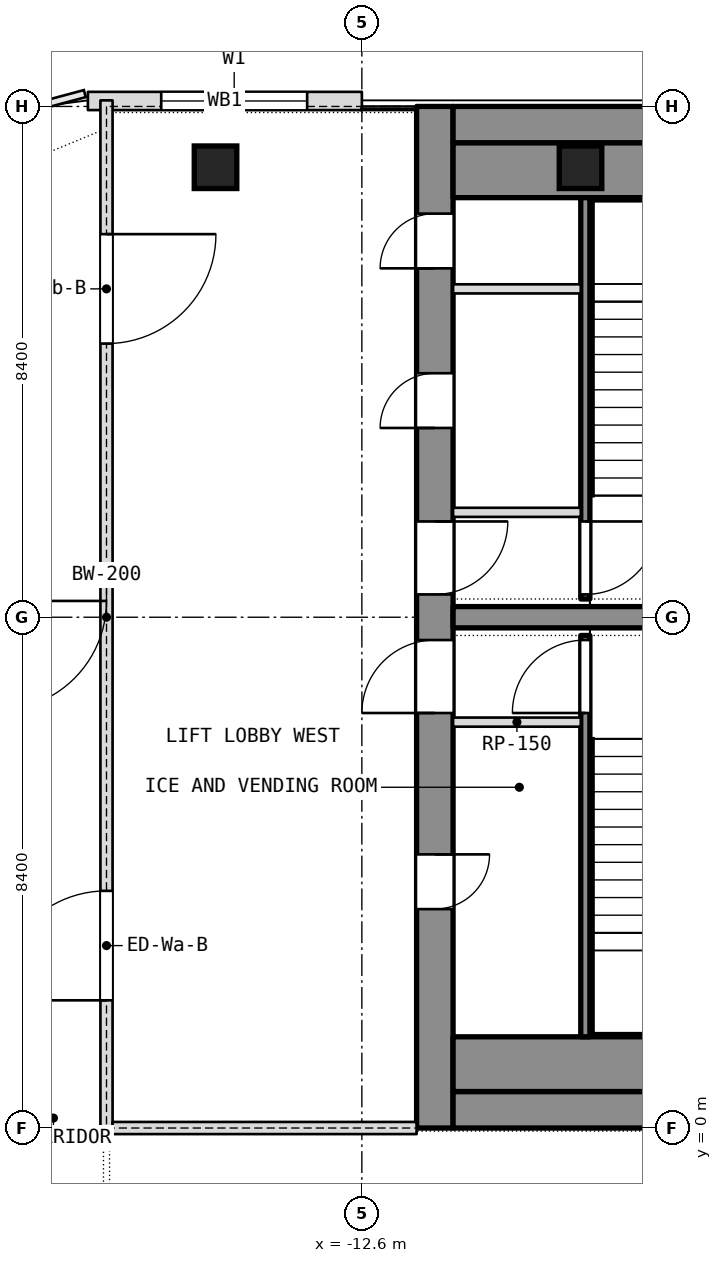
"""IFC4 building model, lengths in metres.
Left out: names, types, materials, properties, quantities, classifications, styles, units other than length and angle.
Written with IfcOpenShell. Run it as: python <this file> out.ifc"""

import sys

from ifc_helpers import new_model, si_unit, direction, frame, frame_2d, origin, origin_2d, place, context, subcontext, project, spatial, rectangle, extrude, element, fill, save


model = new_model("IFC4")
c1 = context("Model", 3, precision=1e-05, world=origin(), true_north=direction((0.0, 1.0)))
c2 = subcontext(c1, "Body", "Model", "MODEL_VIEW")
j1 = project(units=[si_unit("LENGTHUNIT", "METRE"), si_unit("PLANEANGLEUNIT", "RADIAN")], contexts=[c1])
p1 = place(None, origin())
s1 = spatial("IfcSite", under=j1, at=p1, CompositionType="ELEMENT")
p2 = place(p1, origin())
s2 = spatial("IfcBuilding", under=s1, at=p2, CompositionType="ELEMENT")
p3 = place(p2, frame((0.0, 0.0, 274.1)))
s3 = spatial("IfcBuildingStorey", under=s2, at=p3, CompositionType="ELEMENT", Elevation=274.1)
p4 = place(p3, frame((-11.4, 0.0, 0.0), z_axis=(0.0, 0.0, 1.0), x_axis=(0.0, 1.0, 0.0)))
e1 = element("IfcWall", 1, at=p4, inside=s3, PredefinedType="SHEAR", context=c2, shape_type="SweptSolid", body=[
    extrude(rectangle(XDim=16.8, YDim=0.6, at=frame_2d((8.4, 0.0))), origin(), (0.0, 0.0, 1.0), 3.6),
])
p5 = place(p4, frame((3.6, 0.0, 0.0)))
e2 = element("IfcOpeningElement", 2, at=p5, cuts=e1, PredefinedType="OPENING", context=c2, shape_type="SweptSolid", body=[
    extrude(rectangle(XDim=0.9, YDim=2.1, at=frame_2d((0.45, 1.05))), frame((0.0, 0.3, 0.0), z_axis=(0.0, -1.0, 0.0), x_axis=(1.0, 0.0, 0.0)), (0.0, 0.0, 1.0), 0.6),
])
p6 = place(p4, frame((6.825, 0.0, 0.0)))
e3 = element("IfcOpeningElement", 3, at=p6, cuts=e1, PredefinedType="OPENING", context=c2, shape_type="SweptSolid", body=[
    extrude(rectangle(XDim=1.2, YDim=2.1, at=frame_2d((0.6, 1.05))), frame((0.0, 0.3, 0.0), z_axis=(0.0, -1.0, 0.0), x_axis=(1.0, 0.0, 0.0)), (0.0, 0.0, 1.0), 0.6),
])
p7 = place(p4, frame((14.137, 0.0, 0.0)))
e4 = element("IfcOpeningElement", 4, at=p7, cuts=e1, PredefinedType="OPENING", context=c2, shape_type="SweptSolid", body=[
    extrude(rectangle(XDim=0.9, YDim=2.1, at=frame_2d((0.45, 1.05))), frame((0.0, 0.3, 0.0), z_axis=(0.0, -1.0, 0.0), x_axis=(1.0, 0.0, 0.0)), (0.0, 0.0, 1.0), 0.6),
])
p8 = place(p4, frame((11.512, 0.0, 0.0)))
e5 = element("IfcOpeningElement", 5, at=p8, cuts=e1, PredefinedType="OPENING", context=c2, shape_type="SweptSolid", body=[
    extrude(rectangle(XDim=0.9, YDim=2.1, at=frame_2d((0.45, 1.05))), frame((0.0, 0.3, 0.0), z_axis=(0.0, -1.0, 0.0), x_axis=(1.0, 0.0, 0.0)), (0.0, 0.0, 1.0), 0.6),
])
p9 = place(p4, frame((8.775, 0.0, 0.0)))
e6 = element("IfcOpeningElement", 6, at=p9, cuts=e1, PredefinedType="OPENING", context=c2, shape_type="SweptSolid", body=[
    extrude(rectangle(XDim=1.2, YDim=2.1, at=frame_2d((0.6, 1.05))), frame((0.0, 0.3, 0.0), z_axis=(0.0, -1.0, 0.0), x_axis=(1.0, 0.0, 0.0)), (0.0, 0.0, 1.0), 0.6),
])
for number, where, z_axis, x_axis in (
    (7, (-11.1, 0.3, 0.0), (0.0, 0.0, 1.0), (1.0, 0.0, 0.0)),
    (8, (-11.1, 16.5, 0.0), (0.0, 0.0, 1.0), (1.0, 0.0, 0.0)),
):
    element("IfcWall", number, at=place(p3, frame(where, z_axis=z_axis, x_axis=x_axis)), inside=s3, PredefinedType="SHEAR", context=c2, shape_type="SweptSolid", body=[
        extrude(rectangle(XDim=22.2, YDim=0.6, at=frame_2d((11.1, 0.0))), origin(), (0.0, 0.0, 1.0), 3.6),
    ])
p10 = place(p3, frame((-11.1, 8.4, 0.0), z_axis=(0.0, 0.0, 1.0), x_axis=(1.0, 0.0, 0.0)))
e9 = element("IfcWall", 9, at=p10, inside=s3, PredefinedType="SHEAR", context=c2, shape_type="SweptSolid", body=[
    extrude(rectangle(XDim=6.725, YDim=0.35, at=frame_2d((3.363, 0.0))), origin(), (0.0, 0.0, 1.0), 3.6),
])
for number, where, z_axis, x_axis in (
    (10, (-15.007, 15.8, 0.0), (0.0, 0.0, 1.0), (1.0, 0.0, 0.0)),
    (11, (-9.004, 15.8, 0.0), (0.0, 0.0, 1.0), (1.0, 0.0, 0.0)),
):
    element("IfcColumn", number, at=place(p3, frame(where, z_axis=z_axis, x_axis=x_axis)), inside=s3, PredefinedType="COLUMN", context=c2, shape_type="SweptSolid", body=[
        extrude(rectangle(XDim=0.7, YDim=0.7, at=origin_2d()), origin(), (0.0, 0.0, 1.0), 3.6),
    ])
p11 = place(p3, frame((-12.6, 16.89, 0.0), z_axis=(0.0, 0.0, 1.0), x_axis=(-1.0, 0.0, 0.0)))
e12 = element("IfcWall", 12, at=p11, inside=s3, PredefinedType="NOTDEFINED", context=c2, shape_type="SweptSolid", body=[
    extrude(rectangle(XDim=4.506, YDim=0.3, at=frame_2d((2.253, 0.0))), origin(), (0.0, 0.0, 1.0), 3.6),
])
p12 = place(p11, frame((0.9, 0.0, 0.9)))
e13 = element("IfcOpeningElement", 13, at=p12, cuts=e12, PredefinedType="OPENING", context=c2, shape_type="SweptSolid", body=[
    extrude(rectangle(XDim=2.4, YDim=2.1, at=frame_2d((1.2, 1.05))), frame((0.0, 0.15, 0.0), z_axis=(0.0, -1.0, 0.0), x_axis=(1.0, 0.0, 0.0)), (0.0, 0.0, 1.0), 0.3),
])
for number, where, z_axis, x_axis in (
    (14, (-11.1, 1.05, 0.0), (0.0, 0.0, 1.0), (1.0, 0.0, 0.0)),
    (15, (-11.1, 15.75, 0.0), (0.0, 0.0, 1.0), (1.0, 0.0, 0.0)),
):
    element("IfcWall", number, at=place(p3, frame(where, z_axis=z_axis, x_axis=x_axis)), inside=s3, PredefinedType="PARTITIONING", context=c2, shape_type="SweptSolid", body=[
        extrude(rectangle(XDim=22.2, YDim=0.9, at=frame_2d((11.1, 0.0))), origin(), (0.0, 0.0, 1.0), 3.34),
    ])
p13 = place(p3, frame((-8.925, 1.5, 0.0), z_axis=(0.0, 0.0, 1.0), x_axis=(0.0, 1.0, 0.0)))
e16 = element("IfcWall", 16, at=p13, inside=s3, PredefinedType="SHEAR", context=c2, shape_type="SweptSolid", body=[
    extrude(rectangle(XDim=6.6, YDim=0.15, at=frame_2d((3.3, 0.0))), origin(), (0.0, 0.0, 1.0), 3.34),
])
p14 = place(p13, frame((5.325, 0.0, 0.0)))
e17 = element("IfcOpeningElement", 17, at=p14, cuts=e16, PredefinedType="OPENING", context=c2, shape_type="SweptSolid", body=[
    extrude(rectangle(XDim=1.2, YDim=2.1, at=frame_2d((0.6, 1.05))), frame((0.0, 0.075, 0.0), z_axis=(0.0, -1.0, 0.0), x_axis=(1.0, 0.0, 0.0)), (0.0, 0.0, 1.0), 0.15),
])
p15 = place(p3, frame((-11.1, 6.675, 0.0), z_axis=(0.0, 0.0, 1.0), x_axis=(1.0, 0.0, 0.0)))
e18 = element("IfcWall", 18, at=p15, inside=s3, PredefinedType="PARTITIONING", context=c2, shape_type="SweptSolid", body=[
    extrude(rectangle(XDim=2.1, YDim=0.15, at=frame_2d((1.05, 0.0))), origin(), (0.0, 0.0, 1.0), 3.34),
])
p16 = place(p3, frame((-8.925, 8.7, 0.0), z_axis=(0.0, 0.0, 1.0), x_axis=(0.0, 1.0, 0.0)))
e19 = element("IfcWall", 19, at=p16, inside=s3, PredefinedType="SHEAR", context=c2, shape_type="SweptSolid", body=[
    extrude(rectangle(XDim=6.6, YDim=0.15, at=frame_2d((3.3, 0.0))), origin(), (0.0, 0.0, 1.0), 3.34),
])
p17 = place(p16, frame((0.075, 0.0, 0.0)))
e20 = element("IfcOpeningElement", 20, at=p17, cuts=e19, PredefinedType="OPENING", context=c2, shape_type="SweptSolid", body=[
    extrude(rectangle(XDim=1.2, YDim=2.1, at=frame_2d((0.6, 1.05))), frame((0.0, 0.075, 0.0), z_axis=(0.0, -1.0, 0.0), x_axis=(1.0, 0.0, 0.0)), (0.0, 0.0, 1.0), 0.15),
])
for number, where, z_axis, x_axis in (
    (21, (-11.1, 10.125, 0.0), (0.0, 0.0, 1.0), (1.0, 0.0, 0.0)),
    (22, (-11.1, 13.8, 0.0), (0.0, 0.0, 1.0), (1.0, 0.0, 0.0)),
):
    element("IfcWall", number, at=place(p3, frame(where, z_axis=z_axis, x_axis=x_axis)), inside=s3, PredefinedType="PARTITIONING", context=c2, shape_type="SweptSolid", body=[
        extrude(rectangle(XDim=2.1, YDim=0.15, at=frame_2d((1.05, 0.0))), origin(), (0.0, 0.0, 1.0), 3.34),
    ])
p18 = place(p3, frame((-16.8, -0.1, 0.0), z_axis=(0.0, 0.0, 1.0), x_axis=(0.0, 1.0, 0.0)))
e23 = element("IfcWall", 23, at=p18, inside=s3, PredefinedType="PARTITIONING", context=c2, shape_type="SweptSolid", body=[
    extrude(rectangle(XDim=17.0, YDim=0.2, at=frame_2d((8.5, 0.0))), origin(), (0.0, 0.0, 1.0), 3.34),
])
p19 = place(p18, frame((2.2, 0.0, 0.0)))
e24 = element("IfcOpeningElement", 24, at=p19, cuts=e23, PredefinedType="OPENING", context=c2, shape_type="SweptSolid", body=[
    extrude(rectangle(XDim=1.8, YDim=2.1, at=frame_2d((0.9, 1.05))), frame((0.0, 0.1, 0.0), z_axis=(0.0, -1.0, 0.0), x_axis=(1.0, 0.0, 0.0)), (0.0, 0.0, 1.0), 0.2),
])
p20 = place(p18, frame((13.0, 0.0, 0.0)))
e25 = element("IfcOpeningElement", 25, at=p20, cuts=e23, PredefinedType="OPENING", context=c2, shape_type="SweptSolid", body=[
    extrude(rectangle(XDim=1.8, YDim=2.1, at=frame_2d((0.9, 1.05))), frame((0.0, 0.1, 0.0), z_axis=(0.0, -1.0, 0.0), x_axis=(1.0, 0.0, 0.0)), (0.0, 0.0, 1.0), 0.2),
])
p21 = place(p3, frame((-16.7, 0.0, 0.0), z_axis=(0.0, 0.0, 1.0), x_axis=(1.0, 0.0, 0.0)))
e26 = element("IfcWall", 26, at=p21, inside=s3, PredefinedType="PARTITIONING", context=c2, shape_type="SweptSolid", body=[
    extrude(rectangle(XDim=5.0, YDim=0.2, at=frame_2d((2.5, 0.0))), origin(), (0.0, 0.0, 1.0), 3.0),
])
p22 = place(p12, origin())
e27 = element("IfcWindow", 27, at=p22, inside=s3, PartitioningType="SINGLE_PANEL", PredefinedType="WINDOW", context=c2, shape_type="SweptSolid", body=[
    extrude(rectangle(XDim=2.4, YDim=2.1, at=frame_2d((1.2, 1.05))), frame((0.0, 0.03, 0.0), z_axis=(0.0, -1.0, 0.0), x_axis=(1.0, 0.0, 0.0)), (0.0, 0.0, 1.0), 0.06),
])
fill(e13, e27)
p23 = place(p5, origin())
e28 = element("IfcDoor", 28, at=p23, inside=s3, OperationType="SINGLE_SWING_LEFT", PredefinedType="DOOR", context=c2, shape_type="SweptSolid", body=[
    extrude(rectangle(XDim=0.9, YDim=2.1, at=frame_2d((0.45, 1.05))), frame((0.0, 0.025, 0.0), z_axis=(0.0, -1.0, 0.0), x_axis=(1.0, 0.0, 0.0)), (0.0, 0.0, 1.0), 0.05),
])
fill(e2, e28)
p24 = place(p6, origin())
e29 = element("IfcDoor", 29, at=p24, inside=s3, OperationType="SINGLE_SWING_LEFT", PredefinedType="DOOR", context=c2, shape_type="SweptSolid", body=[
    extrude(rectangle(XDim=1.2, YDim=2.1, at=frame_2d((0.6, 1.05))), frame((0.0, 0.025, 0.0), z_axis=(0.0, -1.0, 0.0), x_axis=(1.0, 0.0, 0.0)), (0.0, 0.0, 1.0), 0.05),
])
fill(e3, e29)
p25 = place(p14, origin())
e30 = element("IfcDoor", 30, at=p25, inside=s3, OperationType="SINGLE_SWING_LEFT", PredefinedType="DOOR", context=c2, shape_type="SweptSolid", body=[
    extrude(rectangle(XDim=1.2, YDim=2.1, at=frame_2d((0.6, 1.05))), frame((0.0, 0.025, 0.0), z_axis=(0.0, -1.0, 0.0), x_axis=(1.0, 0.0, 0.0)), (0.0, 0.0, 1.0), 0.05),
])
fill(e17, e30)
p26 = place(p7, origin())
e31 = element("IfcDoor", 31, at=p26, inside=s3, OperationType="SINGLE_SWING_LEFT", PredefinedType="DOOR", context=c2, shape_type="SweptSolid", body=[
    extrude(rectangle(XDim=0.9, YDim=2.1, at=frame_2d((0.45, 1.05))), frame((0.0, 0.025, 0.0), z_axis=(0.0, -1.0, 0.0), x_axis=(1.0, 0.0, 0.0)), (0.0, 0.0, 1.0), 0.05),
])
fill(e4, e31)
p27 = place(p8, origin())
e32 = element("IfcDoor", 32, at=p27, inside=s3, OperationType="SINGLE_SWING_LEFT", PredefinedType="DOOR", context=c2, shape_type="SweptSolid", body=[
    extrude(rectangle(XDim=0.9, YDim=2.1, at=frame_2d((0.45, 1.05))), frame((0.0, 0.025, 0.0), z_axis=(0.0, -1.0, 0.0), x_axis=(1.0, 0.0, 0.0)), (0.0, 0.0, 1.0), 0.05),
])
fill(e5, e32)
p28 = place(p9, origin())
e33 = element("IfcDoor", 33, at=p28, inside=s3, OperationType="SINGLE_SWING_LEFT", PredefinedType="DOOR", context=c2, shape_type="SweptSolid", body=[
    extrude(rectangle(XDim=1.2, YDim=2.1, at=frame_2d((0.6, 1.05))), frame((0.0, 0.025, 0.0), z_axis=(0.0, -1.0, 0.0), x_axis=(1.0, 0.0, 0.0)), (0.0, 0.0, 1.0), 0.05),
])
fill(e6, e33)
p29 = place(p17, origin())
e34 = element("IfcDoor", 34, at=p29, inside=s3, OperationType="SINGLE_SWING_LEFT", PredefinedType="DOOR", context=c2, shape_type="SweptSolid", body=[
    extrude(rectangle(XDim=1.2, YDim=2.1, at=frame_2d((0.6, 1.05))), frame((0.0, 0.025, 0.0), z_axis=(0.0, -1.0, 0.0), x_axis=(1.0, 0.0, 0.0)), (0.0, 0.0, 1.0), 0.05),
])
fill(e20, e34)
p30 = place(p19, origin())
e35 = element("IfcDoor", 35, at=p30, inside=s3, OperationType="DOUBLE_DOOR_SINGLE_SWING", PredefinedType="DOOR", context=c2, shape_type="SweptSolid", body=[
    extrude(rectangle(XDim=1.8, YDim=2.1, at=frame_2d((0.9, 1.05))), frame((0.0, 0.025, 0.0), z_axis=(0.0, -1.0, 0.0), x_axis=(1.0, 0.0, 0.0)), (0.0, 0.0, 1.0), 0.05),
])
fill(e24, e35)
p31 = place(p20, origin())
e36 = element("IfcDoor", 36, at=p31, inside=s3, OperationType="DOUBLE_DOOR_SINGLE_SWING", PredefinedType="DOOR", context=c2, shape_type="SweptSolid", body=[
    extrude(rectangle(XDim=1.8, YDim=2.1, at=frame_2d((0.9, 1.05))), frame((0.0, 0.025, 0.0), z_axis=(0.0, -1.0, 0.0), x_axis=(1.0, 0.0, 0.0)), (0.0, 0.0, 1.0), 0.05),
])
fill(e25, e36)
save(model, sys.argv[1])
